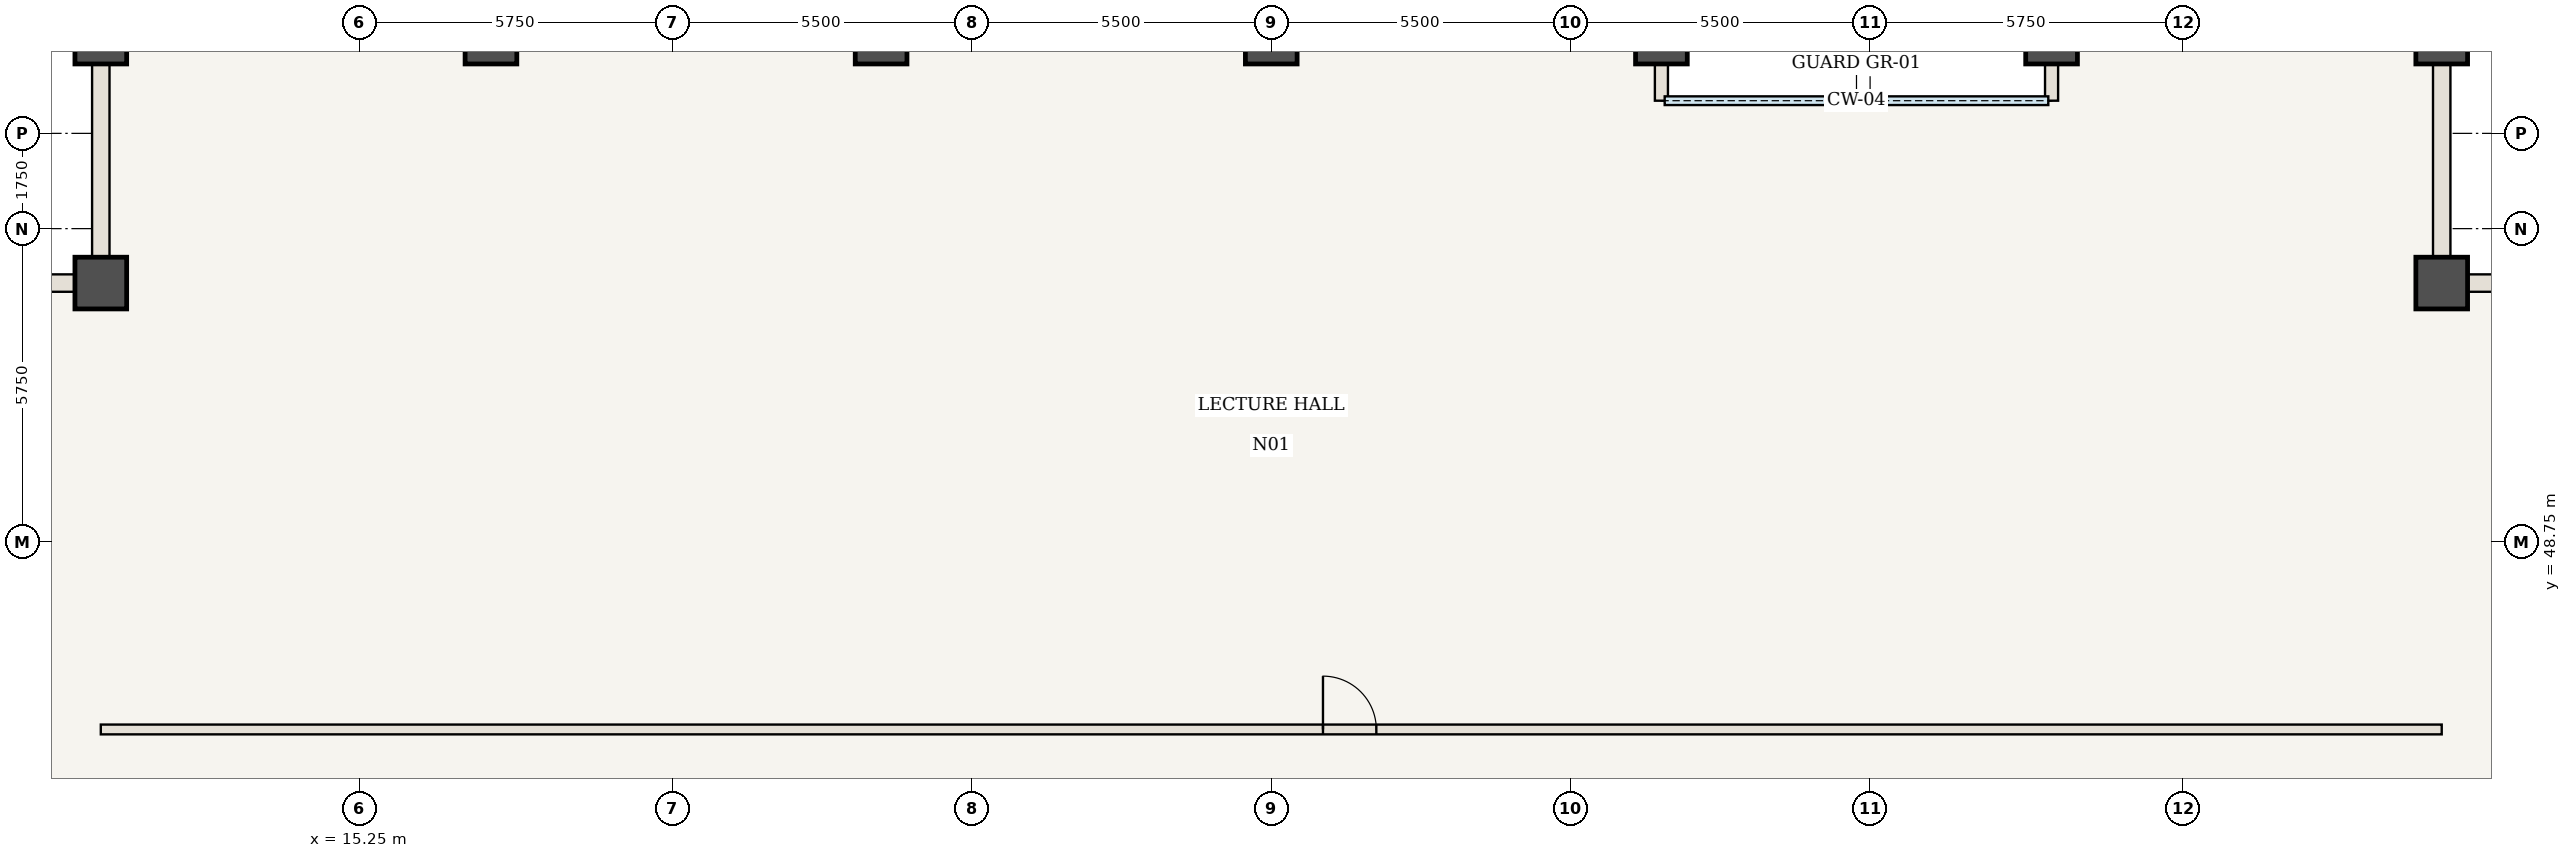
"""IFC4 building model, lengths in metres.
Left out: names, types, materials, properties, quantities, classifications, styles, units other than length and angle.
Written with IfcOpenShell. Run it as: python <this file> out.ifc"""

import sys

from ifc_helpers import new_model, si_unit, direction, frame, frame_2d, origin, origin_2d, place, context, subcontext, project, spatial, rectangle, extrude, element, fill, save


model = new_model("IFC4")
c1 = context("Model", 3, precision=1e-05, world=origin(), true_north=direction((0.0, 1.0)))
c2 = subcontext(c1, "Body", "Model", "MODEL_VIEW")
j1 = project(units=[si_unit("LENGTHUNIT", "METRE"), si_unit("PLANEANGLEUNIT", "RADIAN")], contexts=[c1])
p1 = place(None, origin())
s1 = spatial("IfcSite", under=j1, at=p1, CompositionType="ELEMENT")
p2 = place(p1, origin())
s2 = spatial("IfcBuilding", under=s1, at=p2, CompositionType="ELEMENT")
p3 = place(p2, frame((0.0, 0.0, 141.4)))
s3 = spatial("IfcBuildingStorey", under=s2, at=p3, CompositionType="ELEMENT", Elevation=141.4)
for number, where, z_axis, x_axis in (
    (1, (53.5, 53.5, 0.0), (0.0, 0.0, 1.0), (1.0, 0.0, 0.0)),
    (2, (53.5, 58.0, 0.0), (0.0, 0.0, 1.0), (1.0, 0.0, 0.0)),
    (3, (10.5, 58.0, 0.0), (0.0, 0.0, 1.0), (1.0, 0.0, 0.0)),
    (4, (10.5, 53.5, 0.0), (0.0, 0.0, 1.0), (1.0, 0.0, 0.0)),
    (5, (17.667, 58.0, 0.0), (0.0, 0.0, 1.0), (1.0, 0.0, 0.0)),
    (6, (24.833, 58.0, 0.0), (0.0, 0.0, 1.0), (1.0, 0.0, 0.0)),
    (7, (32.0, 58.0, 0.0), (0.0, 0.0, 1.0), (1.0, 0.0, 0.0)),
    (8, (39.167, 58.0, 0.0), (0.0, 0.0, 1.0), (1.0, 0.0, 0.0)),
    (9, (46.333, 58.0, 0.0), (0.0, 0.0, 1.0), (1.0, 0.0, 0.0)),
):
    element("IfcColumn", number, at=place(p3, frame(where, z_axis=z_axis, x_axis=x_axis)), inside=s3, PredefinedType="COLUMN", context=c2, shape_type="SweptSolid", body=[
        extrude(rectangle(XDim=0.95, YDim=0.95, at=origin_2d()), origin(), (0.0, 0.0, 1.0), 3.85),
    ])
p4 = place(p3, frame((10.5, 45.3, 0.0), z_axis=(0.0, 0.0, 1.0), x_axis=(1.0, 0.0, 0.0)))
e10 = element("IfcWall", 10, at=p4, inside=s3, PredefinedType="STANDARD", context=c2, shape_type="SweptSolid", body=[
    extrude(rectangle(XDim=43.0, YDim=0.18, at=frame_2d((21.5, 0.0))), origin(), (0.0, 0.0, 1.0), 3.685),
])
p5 = place(p4, frame((22.45, 0.0, 0.0)))
e11 = element("IfcOpeningElement", 11, at=p5, cuts=e10, PredefinedType="OPENING", context=c2, shape_type="SweptSolid", body=[
    extrude(rectangle(XDim=0.98, YDim=2.2, at=frame_2d((0.49, 1.1))), frame((0.0, 0.1, 0.0), z_axis=(0.0, -1.0, 0.0), x_axis=(1.0, 0.0, 0.0)), (0.0, 0.0, 1.0), 0.2),
])
for number, where, z_axis, x_axis in (
    (12, (39.167, 58.0, 0.0), (0.0, 0.0, 1.0), (0.0, -1.0, 0.0)),
    (13, (46.333, 58.0, 0.0), (0.0, 0.0, 1.0), (0.0, -1.0, 0.0)),
):
    element("IfcWall", number, at=place(p3, frame(where, z_axis=z_axis, x_axis=x_axis)), inside=s3, PredefinedType="USERDEFINED", context=c2, shape_type="SweptSolid", body=[
        extrude(rectangle(XDim=1.15, YDim=0.24, at=frame_2d((0.575, 0.0))), origin(), (0.0, 0.0, 1.0), 2.885),
    ])
for number, where, z_axis, x_axis in (
    (14, (53.5, 53.5, 0.0), (0.0, 0.0, 1.0), (1.0, 0.0, 0.0)),
    (15, (53.5, 58.0, 0.0), (0.0, 0.0, 1.0), (0.0, -1.0, 0.0)),
    (16, (10.5, 53.5, 0.0), (0.0, 0.0, 1.0), (0.0, 1.0, 0.0)),
    (17, (6.0, 53.5, 0.0), (0.0, 0.0, 1.0), (1.0, 0.0, 0.0)),
):
    element("IfcWall", number, at=place(p3, frame(where, z_axis=z_axis, x_axis=x_axis)), inside=s3, PredefinedType="USERDEFINED", context=c2, shape_type="SweptSolid", body=[
        extrude(rectangle(XDim=4.5, YDim=0.32, at=frame_2d((2.25, 0.0))), origin(), (0.0, 0.0, 1.0), 2.885),
    ])
p6 = place(p5, origin())
e18 = element("IfcDoor", 18, at=p6, inside=s3, OperationType="SINGLE_SWING_LEFT", PredefinedType="DOOR", context=c2, shape_type="SweptSolid", body=[
    extrude(rectangle(XDim=0.98, YDim=2.2, at=frame_2d((0.49, 1.1))), frame((0.0, 0.025, 0.0), z_axis=(0.0, -1.0, 0.0), x_axis=(1.0, 0.0, 0.0)), (0.0, 0.0, 1.0), 0.05),
])
fill(e11, e18)
save(model, sys.argv[1])
